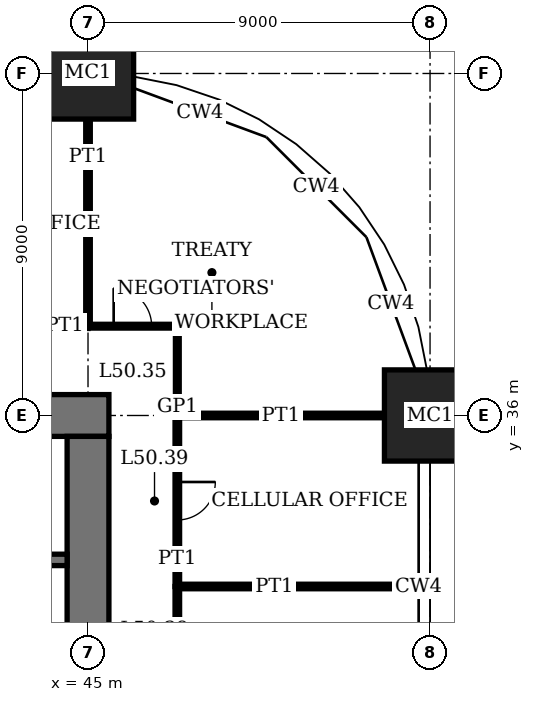
"""IFC4 building model, lengths in metres.
Left out: names, types, materials, properties, quantities, classifications, styles, units other than length and angle.
Written with IfcOpenShell. Run it as: python <this file> out.ifc"""

import sys

from ifc_helpers import new_model, si_unit, direction, frame, frame_2d, origin, origin_2d, place, context, subcontext, project, spatial, rectangle, extrude, element, fill, save


model = new_model("IFC4")
c1 = context("Model", 3, precision=1e-05, world=origin(), true_north=direction((0.0, 1.0)))
c2 = subcontext(c1, "Body", "Model", "MODEL_VIEW")
j1 = project(units=[si_unit("LENGTHUNIT", "METRE"), si_unit("PLANEANGLEUNIT", "RADIAN")], contexts=[c1])
p1 = place(None, origin())
s1 = spatial("IfcSite", under=j1, at=p1, CompositionType="ELEMENT")
p2 = place(p1, origin())
s2 = spatial("IfcBuilding", under=s1, at=p2, CompositionType="ELEMENT")
p3 = place(p2, frame((0.0, 0.0, 206.2)))
s3 = spatial("IfcBuildingStorey", under=s2, at=p3, CompositionType="ELEMENT", Elevation=206.2)
for number, where, z_axis, x_axis in (
    (1, (45.0, 45.0, 0.0), (0.0, 0.0, 1.0), (1.0, 0.0, 0.0)),
    (2, (54.0, 36.0, 0.0), (0.0, 0.0, 1.0), (1.0, 0.0, 0.0)),
):
    element("IfcColumn", number, at=place(p3, frame(where, z_axis=z_axis, x_axis=x_axis)), inside=s3, PredefinedType="COLUMN", context=c2, shape_type="SweptSolid", body=[
        extrude(rectangle(XDim=2.4, YDim=2.4, at=origin_2d()), origin(), (0.0, 0.0, 1.0), 4.0),
    ])
p4 = place(p3, frame((45.55, 36.0, 0.0), z_axis=(0.0, 0.0, 1.0), x_axis=(-1.0, 0.0, 0.0)))
e3 = element("IfcWall", 3, at=p4, inside=s3, PredefinedType="SHEAR", context=c2, shape_type="SweptSolid", body=[
    extrude(rectangle(XDim=28.1, YDim=1.1, at=frame_2d((14.05, 0.0))), origin(), (0.0, 0.0, 1.0), 4.0),
])
p5 = place(p4, frame((11.55, 0.0, 0.0)))
e4 = element("IfcOpeningElement", 4, at=p5, cuts=e3, PredefinedType="OPENING", context=c2, shape_type="SweptSolid", body=[
    extrude(rectangle(XDim=1.0, YDim=2.4, at=frame_2d((0.5, 1.2))), frame((0.0, 0.56, 0.0), z_axis=(0.0, -1.0, 0.0), x_axis=(1.0, 0.0, 0.0)), (0.0, 0.0, 1.0), 1.12),
])
p6 = place(p4, frame((16.55, 0.0, 0.0)))
e5 = element("IfcOpeningElement", 5, at=p6, cuts=e3, PredefinedType="OPENING", context=c2, shape_type="SweptSolid", body=[
    extrude(rectangle(XDim=1.0, YDim=2.4, at=frame_2d((0.5, 1.2))), frame((0.0, 0.56, 0.0), z_axis=(0.0, -1.0, 0.0), x_axis=(1.0, 0.0, 0.0)), (0.0, 0.0, 1.0), 1.12),
])
p7 = place(p4, frame((20.0, 0.0, 0.0)))
e6 = element("IfcOpeningElement", 6, at=p7, cuts=e3, PredefinedType="OPENING", context=c2, shape_type="SweptSolid", body=[
    extrude(rectangle(XDim=1.1, YDim=2.4, at=frame_2d((0.55, 1.2))), frame((0.0, 0.56, 0.0), z_axis=(0.0, -1.0, 0.0), x_axis=(1.0, 0.0, 0.0)), (0.0, 0.0, 1.0), 1.12),
])
p8 = place(p4, frame((24.05, 0.0, 0.0)))
e7 = element("IfcOpeningElement", 7, at=p8, cuts=e3, PredefinedType="OPENING", context=c2, shape_type="SweptSolid", body=[
    extrude(rectangle(XDim=1.0, YDim=2.4, at=frame_2d((0.5, 1.2))), frame((0.0, 0.56, 0.0), z_axis=(0.0, -1.0, 0.0), x_axis=(1.0, 0.0, 0.0)), (0.0, 0.0, 1.0), 1.12),
])
p9 = place(p3, frame((45.0, 18.55, 0.0), z_axis=(0.0, 0.0, 1.0), x_axis=(0.0, 1.0, 0.0)))
e8 = element("IfcWall", 8, at=p9, inside=s3, PredefinedType="SHEAR", context=c2, shape_type="SweptSolid", body=[
    extrude(rectangle(XDim=16.9, YDim=1.1, at=frame_2d((8.45, 0.0))), origin(), (0.0, 0.0, 1.0), 4.0),
])
p10 = place(p9, frame((8.45, 0.0, 0.0)))
e9 = element("IfcOpeningElement", 9, at=p10, cuts=e8, PredefinedType="OPENING", context=c2, shape_type="SweptSolid", body=[
    extrude(rectangle(XDim=1.8, YDim=2.4, at=frame_2d((0.9, 1.2))), frame((0.0, 0.56, 0.0), z_axis=(0.0, -1.0, 0.0), x_axis=(1.0, 0.0, 0.0)), (0.0, 0.0, 1.0), 1.12),
])
p11 = place(p3, frame((36.15, 32.2, 0.0), z_axis=(0.0, 0.0, 1.0), x_axis=(1.0, 0.0, 0.0)))
e10 = element("IfcWall", 10, at=p11, inside=s3, PredefinedType="SHEAR", context=c2, shape_type="SweptSolid", body=[
    extrude(rectangle(XDim=8.3, YDim=0.3, at=frame_2d((4.15, 0.0))), origin(), (0.0, 0.0, 1.0), 4.0),
])
p12 = place(p11, frame((0.45, 0.0, 0.0)))
e11 = element("IfcOpeningElement", 11, at=p12, cuts=e10, PredefinedType="OPENING", context=c2, shape_type="SweptSolid", body=[
    extrude(rectangle(XDim=1.0, YDim=2.4, at=frame_2d((0.5, 1.2))), frame((0.0, 0.16, 0.0), z_axis=(0.0, -1.0, 0.0), x_axis=(1.0, 0.0, 0.0)), (0.0, 0.0, 1.0), 0.32),
])
p13 = place(p3, frame((47.35, 31.5, 0.0), z_axis=(0.0, 0.0, 1.0), x_axis=(1.0, 0.0, 0.0)))
e12 = element("IfcWall", 12, at=p13, inside=s3, PredefinedType="PARTITIONING", context=c2, shape_type="SweptSolid", body=[
    extrude(rectangle(XDim=6.34, YDim=0.12, at=frame_2d((3.17, 0.0))), origin(), (0.0, 0.0, 1.0), 3.1),
])
p14 = place(p3, frame((47.35, 36.0, 0.0), z_axis=(0.0, 0.0, 1.0), x_axis=(1.0, 0.0, 0.0)))
e13 = element("IfcWall", 13, at=p14, inside=s3, PredefinedType="PARTITIONING", context=c2, shape_type="SweptSolid", body=[
    extrude(rectangle(XDim=5.45, YDim=0.12, at=frame_2d((2.725, 0.0))), origin(), (0.0, 0.0, 1.0), 3.05),
])
p15 = place(p3, frame((40.5, 38.35, 0.0), z_axis=(0.0, 0.0, 1.0), x_axis=(1.0, 0.0, 0.0)))
e14 = element("IfcWall", 14, at=p15, inside=s3, PredefinedType="PARTITIONING", context=c2, shape_type="SweptSolid", body=[
    extrude(rectangle(XDim=4.5, YDim=0.12, at=frame_2d((2.25, 0.0))), origin(), (0.0, 0.0, 1.0), 3.75),
])
p16 = place(p15, frame((1.75, 0.0, 0.0)))
e15 = element("IfcOpeningElement", 15, at=p16, cuts=e14, PredefinedType="OPENING", context=c2, shape_type="SweptSolid", body=[
    extrude(rectangle(XDim=1.0, YDim=2.4, at=frame_2d((0.5, 1.2))), frame((0.0, 0.07, 0.0), z_axis=(0.0, -1.0, 0.0), x_axis=(1.0, 0.0, 0.0)), (0.0, 0.0, 1.0), 0.14),
])
p17 = place(p3, frame((45.0, 38.35, 0.0), z_axis=(0.0, 0.0, 1.0), x_axis=(1.0, 0.0, 0.0)))
e16 = element("IfcWall", 16, at=p17, inside=s3, PredefinedType="PARTITIONING", context=c2, shape_type="SweptSolid", body=[
    extrude(rectangle(XDim=2.35, YDim=0.1, at=frame_2d((1.175, 0.0))), origin(), (0.0, 0.0, 1.0), 3.75),
])
p18 = place(p17, frame((0.675, 0.0, 0.0)))
e17 = element("IfcOpeningElement", 17, at=p18, cuts=e16, PredefinedType="OPENING", context=c2, shape_type="SweptSolid", body=[
    extrude(rectangle(XDim=1.0, YDim=2.4, at=frame_2d((0.5, 1.2))), frame((0.0, 0.06, 0.0), z_axis=(0.0, -1.0, 0.0), x_axis=(1.0, 0.0, 0.0)), (0.0, 0.0, 1.0), 0.12),
])
p19 = place(p3, frame((45.0, 38.35, 0.0), z_axis=(0.0, 0.0, 1.0), x_axis=(0.0, 1.0, 0.0)))
e18 = element("IfcWall", 18, at=p19, inside=s3, PredefinedType="PARTITIONING", context=c2, shape_type="SweptSolid", body=[
    extrude(rectangle(XDim=5.45, YDim=0.12, at=frame_2d((2.725, 0.0))), origin(), (0.0, 0.0, 1.0), 3.05),
])
p20 = place(p3, frame((47.35, 27.0, 0.0), z_axis=(0.0, 0.0, 1.0), x_axis=(0.0, 1.0, 0.0)))
e19 = element("IfcWall", 19, at=p20, inside=s3, PredefinedType="PARTITIONING", context=c2, shape_type="SweptSolid", body=[
    extrude(rectangle(XDim=4.5, YDim=0.12, at=frame_2d((2.25, 0.0))), origin(), (0.0, 0.0, 1.0), 3.75),
])
p21 = place(p20, frame((1.75, 0.0, 0.0)))
e20 = element("IfcOpeningElement", 20, at=p21, cuts=e19, PredefinedType="OPENING", context=c2, shape_type="SweptSolid", body=[
    extrude(rectangle(XDim=1.0, YDim=2.4, at=frame_2d((0.5, 1.2))), frame((0.0, 0.07, 0.0), z_axis=(0.0, -1.0, 0.0), x_axis=(1.0, 0.0, 0.0)), (0.0, 0.0, 1.0), 0.14),
])
p22 = place(p3, frame((47.35, 31.5, 0.0), z_axis=(0.0, 0.0, 1.0), x_axis=(0.0, 1.0, 0.0)))
e21 = element("IfcWall", 21, at=p22, inside=s3, PredefinedType="PARTITIONING", context=c2, shape_type="SweptSolid", body=[
    extrude(rectangle(XDim=4.5, YDim=0.12, at=frame_2d((2.25, 0.0))), origin(), (0.0, 0.0, 1.0), 3.75),
])
p23 = place(p22, frame((1.75, 0.0, 0.0)))
e22 = element("IfcOpeningElement", 22, at=p23, cuts=e21, PredefinedType="OPENING", context=c2, shape_type="SweptSolid", body=[
    extrude(rectangle(XDim=1.0, YDim=2.4, at=frame_2d((0.5, 1.2))), frame((0.0, 0.07, 0.0), z_axis=(0.0, -1.0, 0.0), x_axis=(1.0, 0.0, 0.0)), (0.0, 0.0, 1.0), 0.14),
])
p24 = place(p3, frame((47.35, 36.0, 0.0), z_axis=(0.0, 0.0, 1.0), x_axis=(0.0, 1.0, 0.0)))
e23 = element("IfcWall", 23, at=p24, inside=s3, PredefinedType="PARTITIONING", context=c2, shape_type="SweptSolid", body=[
    extrude(rectangle(XDim=2.35, YDim=0.1, at=frame_2d((1.175, 0.0))), origin(), (0.0, 0.0, 1.0), 3.75),
])
p25 = place(p18, origin())
e24 = element("IfcDoor", 24, at=p25, inside=s3, OperationType="SINGLE_SWING_RIGHT", PredefinedType="DOOR", context=c2, shape_type="SweptSolid", body=[
    extrude(rectangle(XDim=1.0, YDim=2.4, at=frame_2d((0.5, 1.2))), frame((0.0, 0.02, 0.0), z_axis=(0.0, -1.0, 0.0), x_axis=(1.0, 0.0, 0.0)), (0.0, 0.0, 1.0), 0.04),
])
fill(e17, e24)
p26 = place(p23, origin())
e25 = element("IfcDoor", 25, at=p26, inside=s3, OperationType="SINGLE_SWING_RIGHT", PredefinedType="DOOR", context=c2, shape_type="SweptSolid", body=[
    extrude(rectangle(XDim=1.0, YDim=2.4, at=frame_2d((0.5, 1.2))), frame((0.0, 0.025, 0.0), z_axis=(0.0, -1.0, 0.0), x_axis=(1.0, 0.0, 0.0)), (0.0, 0.0, 1.0), 0.05),
])
fill(e22, e25)
save(model, sys.argv[1])
